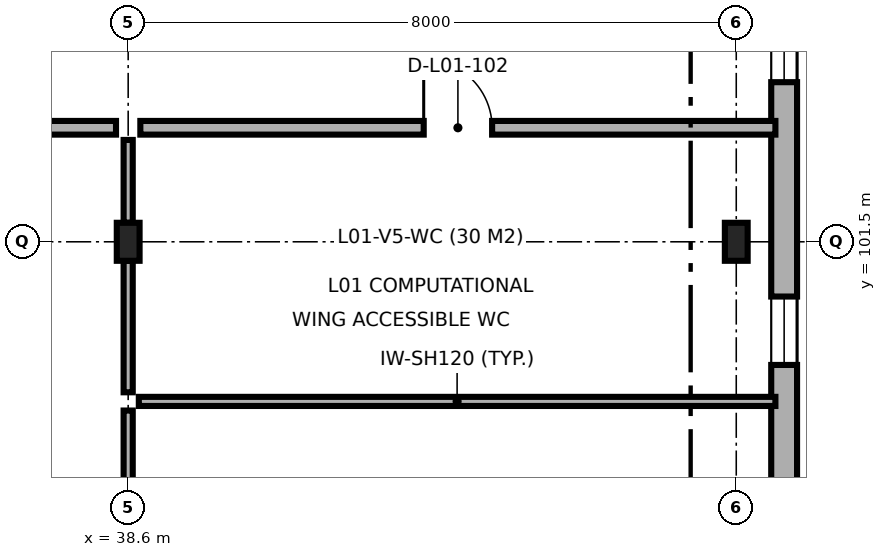
"""IFC4 building model, lengths in metres.
Left out: names, types, materials, properties, quantities, classifications, styles, units other than length and angle.
Written with IfcOpenShell. Run it as: python <this file> out.ifc"""

import sys

from ifc_helpers import new_model, si_unit, direction, frame, frame_2d, origin, origin_2d, place, context, subcontext, project, spatial, rectangle, i_section, extrude, element, fill, save


model = new_model("IFC4")
c1 = context("Model", 3, precision=1e-05, world=origin(), true_north=direction((0.0, 1.0)))
c2 = subcontext(c1, "Body", "Model", "MODEL_VIEW")
j1 = project(units=[si_unit("LENGTHUNIT", "METRE"), si_unit("PLANEANGLEUNIT", "RADIAN")], contexts=[c1])
p1 = place(None, origin())
s1 = spatial("IfcSite", under=j1, at=p1, CompositionType="ELEMENT")
p2 = place(p1, origin())
s2 = spatial("IfcBuilding", under=s1, at=p2, CompositionType="ELEMENT")
p3 = place(p2, frame((0.0, 0.0, 4.8)))
s3 = spatial("IfcBuildingStorey", under=s2, at=p3, CompositionType="ELEMENT", Elevation=4.8)
for number, where, z_axis, x_axis in (
    (1, (38.6, 101.5, 0.0), (0.0, 0.0, 1.0), (1.0, 0.0, 0.0)),
    (2, (46.6, 101.5, 0.0), (0.0, 0.0, 1.0), (1.0, 0.0, 0.0)),
):
    element("IfcColumn", number, at=place(p3, frame(where, z_axis=z_axis, x_axis=x_axis)), inside=s3, PredefinedType="COLUMN", context=c2, shape_type="SweptSolid", body=[
        extrude(i_section(OverallWidth=0.3, OverallDepth=0.5, WebThickness=0.014, FlangeThickness=0.028, FilletRadius=0.027, at=origin_2d()), origin(), (0.0, 0.0, 1.0), 4.5),
    ])
p4 = place(p3, frame((47.23, 88.623, 0.0), z_axis=(0.0, 0.0, 1.0), x_axis=(0.0, 1.0, 0.0)))
e3 = element("IfcWall", 3, at=p4, inside=s3, PredefinedType="SOLIDWALL", context=c2, shape_type="SweptSolid", body=[
    extrude(rectangle(XDim=27.477, YDim=0.34, at=frame_2d((13.739, 0.0))), origin(), (0.0, 0.0, 1.0), 4.25),
])
p5 = place(p4, frame((1.589, 0.0, 0.9)))
e4 = element("IfcOpeningElement", 4, at=p5, cuts=e3, PredefinedType="OPENING", context=c2, shape_type="SweptSolid", body=[
    extrude(rectangle(XDim=1.8, YDim=1.5, at=frame_2d((0.9, 0.75))), frame((0.0, 0.18, 0.0), z_axis=(0.0, -1.0, 0.0), x_axis=(1.0, 0.0, 0.0)), (0.0, 0.0, 1.0), 0.36),
])
p6 = place(p4, frame((7.347, 0.0, 0.9)))
e5 = element("IfcOpeningElement", 5, at=p6, cuts=e3, PredefinedType="OPENING", context=c2, shape_type="SweptSolid", body=[
    extrude(rectangle(XDim=1.2, YDim=2.4, at=frame_2d((0.6, 1.2))), frame((0.0, 0.18, 0.0), z_axis=(0.0, -1.0, 0.0), x_axis=(1.0, 0.0, 0.0)), (0.0, 0.0, 1.0), 0.36),
])
p7 = place(p4, frame((11.257, 0.0, 0.9)))
e6 = element("IfcOpeningElement", 6, at=p7, cuts=e3, PredefinedType="OPENING", context=c2, shape_type="SweptSolid", body=[
    extrude(rectangle(XDim=0.9, YDim=1.8, at=frame_2d((0.45, 0.9))), frame((0.0, 0.18, 0.0), z_axis=(0.0, -1.0, 0.0), x_axis=(1.0, 0.0, 0.0)), (0.0, 0.0, 1.0), 0.36),
])
p8 = place(p4, frame((14.977, 0.0, 0.9)))
e7 = element("IfcOpeningElement", 7, at=p8, cuts=e3, PredefinedType="OPENING", context=c2, shape_type="SweptSolid", body=[
    extrude(rectangle(XDim=1.2, YDim=1.8, at=frame_2d((0.6, 0.9))), frame((0.0, 0.18, 0.0), z_axis=(0.0, -1.0, 0.0), x_axis=(1.0, 0.0, 0.0)), (0.0, 0.0, 1.0), 0.36),
])
p9 = place(p4, frame((18.257, 0.0, 0.9)))
e8 = element("IfcOpeningElement", 8, at=p9, cuts=e3, PredefinedType="OPENING", context=c2, shape_type="SweptSolid", body=[
    extrude(rectangle(XDim=0.9, YDim=1.4, at=frame_2d((0.45, 0.7))), frame((0.0, 0.18, 0.0), z_axis=(0.0, -1.0, 0.0), x_axis=(1.0, 0.0, 0.0)), (0.0, 0.0, 1.0), 0.36),
])
p10 = place(p4, frame((23.192, 0.0, 0.9)))
e9 = element("IfcOpeningElement", 9, at=p10, cuts=e3, PredefinedType="OPENING", context=c2, shape_type="SweptSolid", body=[
    extrude(rectangle(XDim=1.35, YDim=1.95, at=frame_2d((0.675, 0.975))), frame((0.0, 0.18, 0.0), z_axis=(0.0, -1.0, 0.0), x_axis=(1.0, 0.0, 0.0)), (0.0, 0.0, 1.0), 0.36),
])
p11 = place(p3, frame((38.74, 99.4, 0.0), z_axis=(0.0, 0.0, 1.0), x_axis=(1.0, 0.0, 0.0)))
e10 = element("IfcWall", 10, at=p11, inside=s3, PredefinedType="PARTITIONING", context=c2, shape_type="SweptSolid", body=[
    extrude(rectangle(XDim=8.375, YDim=0.12, at=frame_2d((4.188, 0.0))), origin(), (0.0, 0.0, 1.0), 4.25),
])
p12 = place(p3, frame((38.6, 93.75, 0.0), z_axis=(0.0, 0.0, 1.0), x_axis=(0.0, 1.0, 0.0)))
e11 = element("IfcWall", 11, at=p12, inside=s3, PredefinedType="PARTITIONING", context=c2, shape_type="SweptSolid", body=[
    extrude(rectangle(XDim=5.53, YDim=0.12, at=frame_2d((2.765, 0.0))), origin(), (0.0, 0.0, 1.0), 3.85),
])
p13 = place(p3, frame((38.6, 99.52, 0.0), z_axis=(0.0, 0.0, 1.0), x_axis=(0.0, 1.0, 0.0)))
e12 = element("IfcWall", 12, at=p13, inside=s3, PredefinedType="PARTITIONING", context=c2, shape_type="SweptSolid", body=[
    extrude(rectangle(XDim=1.73, YDim=0.12, at=frame_2d((0.865, 0.0))), origin(), (0.0, 0.0, 1.0), 3.85),
])
p14 = place(p3, frame((38.6, 101.75, 0.0), z_axis=(0.0, 0.0, 1.0), x_axis=(0.0, 1.0, 0.0)))
e13 = element("IfcWall", 13, at=p14, inside=s3, PredefinedType="PARTITIONING", context=c2, shape_type="SweptSolid", body=[
    extrude(rectangle(XDim=1.09, YDim=0.12, at=frame_2d((0.545, 0.0))), origin(), (0.0, 0.0, 1.0), 3.85),
])
p15 = place(p3, frame((30.56, 103.0, 0.0), z_axis=(0.0, 0.0, 1.0), x_axis=(1.0, 0.0, 0.0)))
e14 = element("IfcWall", 14, at=p15, inside=s3, PredefinedType="PARTITIONING", context=c2, shape_type="SweptSolid", body=[
    extrude(rectangle(XDim=7.88, YDim=0.18, at=frame_2d((3.94, 0.0))), origin(), (0.0, 0.0, 1.0), 4.25),
])
p16 = place(p15, frame((3.39, 0.0, 0.0)))
e15 = element("IfcOpeningElement", 15, at=p16, cuts=e14, PredefinedType="OPENING", context=c2, shape_type="SweptSolid", body=[
    extrude(rectangle(XDim=1.1, YDim=2.15, at=frame_2d((0.55, 1.075))), frame((0.0, 0.1, 0.0), z_axis=(0.0, -1.0, 0.0), x_axis=(1.0, 0.0, 0.0)), (0.0, 0.0, 1.0), 0.2),
])
p17 = place(p3, frame((38.76, 103.0, 0.0), z_axis=(0.0, 0.0, 1.0), x_axis=(1.0, 0.0, 0.0)))
e16 = element("IfcWall", 16, at=p17, inside=s3, PredefinedType="PARTITIONING", context=c2, shape_type="SweptSolid", body=[
    extrude(rectangle(XDim=8.355, YDim=0.18, at=frame_2d((4.177, 0.0))), origin(), (0.0, 0.0, 1.0), 4.25),
])
p18 = place(p17, frame((3.728, 0.0, 0.0)))
e17 = element("IfcOpeningElement", 17, at=p18, cuts=e16, PredefinedType="OPENING", context=c2, shape_type="SweptSolid", body=[
    extrude(rectangle(XDim=0.9, YDim=2.1, at=frame_2d((0.45, 1.05))), frame((0.0, 0.1, 0.0), z_axis=(0.0, -1.0, 0.0), x_axis=(1.0, 0.0, 0.0)), (0.0, 0.0, 1.0), 0.2),
])
p19 = place(p7, origin())
e18 = element("IfcWindow", 18, at=p19, inside=s3, PartitioningType="SINGLE_PANEL", PredefinedType="WINDOW", context=c2, shape_type="SweptSolid", body=[
    extrude(rectangle(XDim=0.9, YDim=1.8, at=frame_2d((0.45, 0.9))), frame((0.0, 0.03, 0.0), z_axis=(0.0, -1.0, 0.0), x_axis=(1.0, 0.0, 0.0)), (0.0, 0.0, 1.0), 0.06),
])
fill(e6, e18)
p20 = place(p8, origin())
e19 = element("IfcWindow", 19, at=p20, inside=s3, PartitioningType="SINGLE_PANEL", PredefinedType="WINDOW", context=c2, shape_type="SweptSolid", body=[
    extrude(rectangle(XDim=1.2, YDim=1.8, at=frame_2d((0.6, 0.9))), frame((0.0, 0.03, 0.0), z_axis=(0.0, -1.0, 0.0), x_axis=(1.0, 0.0, 0.0)), (0.0, 0.0, 1.0), 0.06),
])
fill(e7, e19)
p21 = place(p18, origin())
e20 = element("IfcDoor", 20, at=p21, inside=s3, OperationType="SINGLE_SWING_LEFT", PredefinedType="DOOR", context=c2, shape_type="SweptSolid", body=[
    extrude(rectangle(XDim=0.9, YDim=2.1, at=frame_2d((0.45, 1.05))), frame((0.0, 0.025, 0.0), z_axis=(0.0, -1.0, 0.0), x_axis=(1.0, 0.0, 0.0)), (0.0, 0.0, 1.0), 0.05),
])
fill(e17, e20)
save(model, sys.argv[1])
